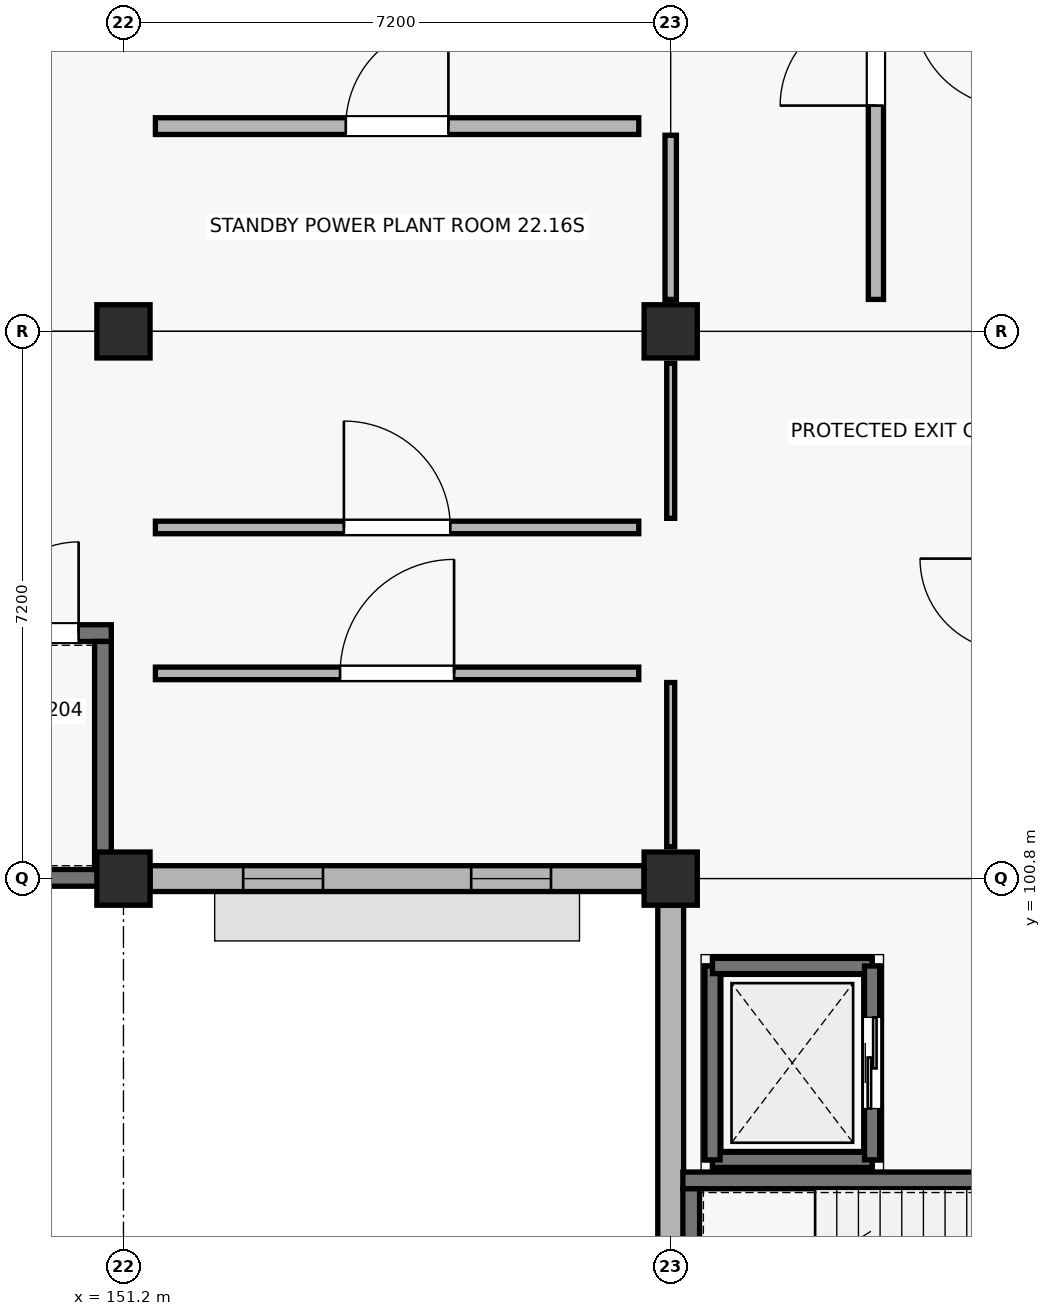
"""IFC4 building model, lengths in metres.
Left out: names, types, materials, properties, quantities, classifications, styles, units other than length and angle.
Written with IfcOpenShell. Run it as: python <this file> out.ifc"""

import sys

from ifc_helpers import new_model, si_unit, direction, frame, frame_2d, origin, origin_2d, place, context, subcontext, project, spatial, rectangle, extrude, element, fill, save


model = new_model("IFC4")
c1 = context("Model", 3, precision=1e-05, world=origin(), true_north=direction((0.0, 1.0)))
c2 = subcontext(c1, "Body", "Model", "MODEL_VIEW")
j1 = project(units=[si_unit("LENGTHUNIT", "METRE"), si_unit("PLANEANGLEUNIT", "RADIAN")], contexts=[c1])
p1 = place(None, origin())
s1 = spatial("IfcSite", under=j1, at=p1, CompositionType="ELEMENT")
p2 = place(p1, origin())
s2 = spatial("IfcBuilding", under=s1, at=p2, CompositionType="ELEMENT")
p3 = place(p2, origin())
s3 = spatial("IfcBuildingStorey", under=s2, at=p3, CompositionType="ELEMENT", Elevation=0.0)
for number, where, z_axis, x_axis in (
    (1, (151.2, 100.8, -0.25), (0.0, 0.0, 1.0), (1.0, 0.0, 0.0)),
    (2, (151.2, 108.0, -0.25), (0.0, 0.0, 1.0), (1.0, 0.0, 0.0)),
    (3, (158.4, 100.8, -0.25), (0.0, 0.0, 1.0), (1.0, 0.0, 0.0)),
    (4, (158.4, 108.0, -0.25), (0.0, 0.0, 1.0), (1.0, 0.0, 0.0)),
):
    element("IfcColumn", number, at=place(p3, frame(where, z_axis=z_axis, x_axis=x_axis)), inside=s3, PredefinedType="COLUMN", context=c2, shape_type="SweptSolid", body=[
        extrude(rectangle(XDim=0.7, YDim=0.7, at=origin_2d()), origin(), (0.0, 0.0, 1.0), 4.75),
    ])
p4 = place(p3, frame((151.55, 100.8, 0.0), z_axis=(0.0, 0.0, 1.0), x_axis=(1.0, 0.0, 0.0)))
e5 = element("IfcWall", 5, at=p4, inside=s3, PredefinedType="SOLIDWALL", context=c2, shape_type="SweptSolid", body=[
    extrude(rectangle(XDim=6.5, YDim=0.34, at=frame_2d((3.25, 0.0))), origin(), (0.0, 0.0, 1.0), 3.47),
])
p5 = place(p4, frame((1.225, 0.0, 0.9)))
e6 = element("IfcOpeningElement", 6, at=p5, cuts=e5, PredefinedType="OPENING", context=c2, shape_type="SweptSolid", body=[
    extrude(rectangle(XDim=1.05, YDim=1.75, at=frame_2d((0.525, 0.875))), frame((0.0, 0.18, 0.0), z_axis=(0.0, -1.0, 0.0), x_axis=(1.0, 0.0, 0.0)), (0.0, 0.0, 1.0), 0.36),
])
p6 = place(p4, frame((4.225, 0.0, 0.9)))
e7 = element("IfcOpeningElement", 7, at=p6, cuts=e5, PredefinedType="OPENING", context=c2, shape_type="SweptSolid", body=[
    extrude(rectangle(XDim=1.05, YDim=1.75, at=frame_2d((0.525, 0.875))), frame((0.0, 0.18, 0.0), z_axis=(0.0, -1.0, 0.0), x_axis=(1.0, 0.0, 0.0)), (0.0, 0.0, 1.0), 0.36),
])
p7 = place(p3, frame((158.4, 100.45, 0.0), z_axis=(0.0, 0.0, 1.0), x_axis=(0.0, -1.0, 0.0)))
e8 = element("IfcWall", 8, at=p7, inside=s3, PredefinedType="SOLIDWALL", context=c2, shape_type="SweptSolid", body=[
    extrude(rectangle(XDim=6.5, YDim=0.34, at=frame_2d((3.25, 0.0))), origin(), (0.0, 0.0, 1.0), 3.52),
])
p8 = place(p3, frame((158.95, 97.1, -0.95), z_axis=(0.0, 0.0, 1.0), x_axis=(1.0, 0.0, 0.0)))
e9 = element("IfcWall", 9, at=p8, inside=s3, PredefinedType="SHEAR", context=c2, shape_type="SweptSolid", body=[
    extrude(rectangle(XDim=2.1, YDim=0.22, at=frame_2d((1.05, 0.0))), origin(), (0.0, 0.0, 1.0), 0.95),
])
p9 = place(p3, frame((161.05, 97.1, -0.95), z_axis=(0.0, 0.0, 1.0), x_axis=(0.0, 1.0, 0.0)))
e10 = element("IfcWall", 10, at=p9, inside=s3, PredefinedType="SHEAR", context=c2, shape_type="SweptSolid", body=[
    extrude(rectangle(XDim=2.55, YDim=0.22, at=frame_2d((1.275, 0.0))), origin(), (0.0, 0.0, 1.0), 0.95),
])
p10 = place(p3, frame((161.05, 99.65, -0.95), z_axis=(0.0, 0.0, 1.0), x_axis=(-1.0, 0.0, 0.0)))
e11 = element("IfcWall", 11, at=p10, inside=s3, PredefinedType="SHEAR", context=c2, shape_type="SweptSolid", body=[
    extrude(rectangle(XDim=2.1, YDim=0.22, at=frame_2d((1.05, 0.0))), origin(), (0.0, 0.0, 1.0), 0.95),
])
p11 = place(p3, frame((158.95, 99.65, -0.95), z_axis=(0.0, 0.0, 1.0), x_axis=(0.0, -1.0, 0.0)))
e12 = element("IfcWall", 12, at=p11, inside=s3, PredefinedType="SHEAR", context=c2, shape_type="SweptSolid", body=[
    extrude(rectangle(XDim=2.55, YDim=0.22, at=frame_2d((1.275, 0.0))), origin(), (0.0, 0.0, 1.0), 0.95),
])
p12 = place(p3, frame((158.56, 96.83, -0.25), z_axis=(0.0, 0.0, 1.0), x_axis=(1.0, 0.0, 0.0)))
e13 = element("IfcWall", 13, at=p12, inside=s3, PredefinedType="SHEAR", context=c2, shape_type="SweptSolid", body=[
    extrude(rectangle(XDim=6.88, YDim=0.22, at=frame_2d((3.44, 0.0))), origin(), (0.0, 0.0, 1.0), 4.47),
])
p13 = place(p12, frame((5.25, 0.0, 0.25)))
e14 = element("IfcOpeningElement", 14, at=p13, cuts=e13, PredefinedType="OPENING", context=c2, shape_type="SweptSolid", body=[
    extrude(rectangle(XDim=1.2, YDim=2.15, at=frame_2d((0.6, 1.075))), frame((0.0, 0.12, 0.0), z_axis=(0.0, -1.0, 0.0), x_axis=(1.0, 0.0, 0.0)), (0.0, 0.0, 1.0), 0.24),
])
p14 = place(p3, frame((158.67, 93.72, -0.25), z_axis=(0.0, 0.0, 1.0), x_axis=(0.0, 1.0, 0.0)))
e15 = element("IfcWall", 15, at=p14, inside=s3, PredefinedType="SHEAR", context=c2, shape_type="SweptSolid", body=[
    extrude(rectangle(XDim=3.0, YDim=0.22, at=frame_2d((1.5, 0.0))), origin(), (0.0, 0.0, 1.0), 4.47),
])
p15 = place(p3, frame((158.95, 97.1, 0.0), z_axis=(0.0, 0.0, 1.0), x_axis=(1.0, 0.0, 0.0)))
e16 = element("IfcWall", 16, at=p15, inside=s3, PredefinedType="SHEAR", context=c2, shape_type="SweptSolid", body=[
    extrude(rectangle(XDim=2.1, YDim=0.2, at=frame_2d((1.05, 0.0))), origin(), (0.0, 0.0, 1.0), 4.22),
])
p16 = place(p3, frame((158.95, 97.1, 0.0), z_axis=(0.0, 0.0, 1.0), x_axis=(0.0, 1.0, 0.0)))
e17 = element("IfcWall", 17, at=p16, inside=s3, PredefinedType="SHEAR", context=c2, shape_type="SweptSolid", body=[
    extrude(rectangle(XDim=2.55, YDim=0.2, at=frame_2d((1.275, 0.0))), origin(), (0.0, 0.0, 1.0), 4.22),
])
p17 = place(p3, frame((158.95, 99.65, 0.0), z_axis=(0.0, 0.0, 1.0), x_axis=(1.0, 0.0, 0.0)))
e18 = element("IfcWall", 18, at=p17, inside=s3, PredefinedType="SHEAR", context=c2, shape_type="SweptSolid", body=[
    extrude(rectangle(XDim=2.1, YDim=0.2, at=frame_2d((1.05, 0.0))), origin(), (0.0, 0.0, 1.0), 4.22),
])
p18 = place(p3, frame((161.05, 97.1, 0.0), z_axis=(0.0, 0.0, 1.0), x_axis=(0.0, 1.0, 0.0)))
e19 = element("IfcWall", 19, at=p18, inside=s3, PredefinedType="SHEAR", context=c2, shape_type="SweptSolid", body=[
    extrude(rectangle(XDim=2.55, YDim=0.2, at=frame_2d((1.275, 0.0))), origin(), (0.0, 0.0, 1.0), 4.22),
])
p19 = place(p18, frame((0.675, 0.0, 0.0)))
e20 = element("IfcOpeningElement", 20, at=p19, cuts=e19, PredefinedType="OPENING", context=c2, shape_type="SweptSolid", body=[
    extrude(rectangle(XDim=1.2, YDim=2.15, at=frame_2d((0.6, 1.075))), frame((0.0, 0.11, 0.0), z_axis=(0.0, -1.0, 0.0), x_axis=(1.0, 0.0, 0.0)), (0.0, 0.0, 1.0), 0.22),
])
p20 = place(p3, frame((144.16, 100.81, -0.25), z_axis=(0.0, 0.0, 1.0), x_axis=(1.0, 0.0, 0.0)))
e21 = element("IfcWall", 21, at=p20, inside=s3, PredefinedType="SHEAR", context=c2, shape_type="SweptSolid", body=[
    extrude(rectangle(XDim=6.88, YDim=0.22, at=frame_2d((3.44, 0.0))), origin(), (0.0, 0.0, 1.0), 4.47),
])
p21 = place(p3, frame((144.16, 104.03, -0.25), z_axis=(0.0, 0.0, 1.0), x_axis=(1.0, 0.0, 0.0)))
e22 = element("IfcWall", 22, at=p21, inside=s3, PredefinedType="SHEAR", context=c2, shape_type="SweptSolid", body=[
    extrude(rectangle(XDim=6.88, YDim=0.22, at=frame_2d((3.44, 0.0))), origin(), (0.0, 0.0, 1.0), 4.47),
])
p22 = place(p21, frame((5.25, 0.0, 0.25)))
e23 = element("IfcOpeningElement", 23, at=p22, cuts=e22, PredefinedType="OPENING", context=c2, shape_type="SweptSolid", body=[
    extrude(rectangle(XDim=1.2, YDim=2.15, at=frame_2d((0.6, 1.075))), frame((0.0, 0.12, 0.0), z_axis=(0.0, -1.0, 0.0), x_axis=(1.0, 0.0, 0.0)), (0.0, 0.0, 1.0), 0.24),
])
p23 = place(p3, frame((150.93, 100.92, -0.25), z_axis=(0.0, 0.0, 1.0), x_axis=(0.0, 1.0, 0.0)))
e24 = element("IfcWall", 24, at=p23, inside=s3, PredefinedType="SHEAR", context=c2, shape_type="SweptSolid", body=[
    extrude(rectangle(XDim=3.0, YDim=0.22, at=frame_2d((1.5, 0.0))), origin(), (0.0, 0.0, 1.0), 4.47),
])
p24 = place(p3, frame((151.62, 103.5, 0.0), z_axis=(0.0, 0.0, 1.0), x_axis=(1.0, 0.0, 0.0)))
e25 = element("IfcWall", 25, at=p24, inside=s3, PredefinedType="PARTITIONING", context=c2, shape_type="SweptSolid", body=[
    extrude(rectangle(XDim=6.36, YDim=0.165, at=frame_2d((3.18, 0.0))), origin(), (0.0, 0.0, 1.0), 3.36),
])
p25 = place(p24, frame((2.43, 0.0, 0.0)))
e26 = element("IfcOpeningElement", 26, at=p25, cuts=e25, PredefinedType="OPENING", context=c2, shape_type="SweptSolid", body=[
    extrude(rectangle(XDim=1.5, YDim=2.2, at=frame_2d((0.75, 1.1))), frame((0.0, 0.093, 0.0), z_axis=(0.0, -1.0, 0.0), x_axis=(1.0, 0.0, 0.0)), (0.0, 0.0, 1.0), 0.185),
])
p26 = place(p3, frame((158.4, 101.22, 0.0), z_axis=(0.0, 0.0, 1.0), x_axis=(0.0, 1.0, 0.0)))
e27 = element("IfcWall", 27, at=p26, inside=s3, PredefinedType="PARTITIONING", context=c2, shape_type="SweptSolid", body=[
    extrude(rectangle(XDim=2.16, YDim=0.105, at=frame_2d((1.08, 0.0))), origin(), (0.0, 0.0, 1.0), 3.36),
])
p27 = place(p3, frame((151.62, 105.42, 0.0), z_axis=(0.0, 0.0, 1.0), x_axis=(1.0, 0.0, 0.0)))
e28 = element("IfcWall", 28, at=p27, inside=s3, PredefinedType="PARTITIONING", context=c2, shape_type="SweptSolid", body=[
    extrude(rectangle(XDim=6.36, YDim=0.165, at=frame_2d((3.18, 0.0))), origin(), (0.0, 0.0, 1.0), 3.36),
])
p28 = place(p27, frame((2.48, 0.0, 0.0)))
e29 = element("IfcOpeningElement", 29, at=p28, cuts=e28, PredefinedType="OPENING", context=c2, shape_type="SweptSolid", body=[
    extrude(rectangle(XDim=1.4, YDim=2.2, at=frame_2d((0.7, 1.1))), frame((0.0, 0.093, 0.0), z_axis=(0.0, -1.0, 0.0), x_axis=(1.0, 0.0, 0.0)), (0.0, 0.0, 1.0), 0.185),
])
p29 = place(p3, frame((158.4, 105.54, 0.0), z_axis=(0.0, 0.0, 1.0), x_axis=(0.0, 1.0, 0.0)))
e30 = element("IfcWall", 30, at=p29, inside=s3, PredefinedType="PARTITIONING", context=c2, shape_type="SweptSolid", body=[
    extrude(rectangle(XDim=2.04, YDim=0.105, at=frame_2d((1.02, 0.0))), origin(), (0.0, 0.0, 1.0), 3.36),
])
p30 = place(p3, frame((151.62, 110.7, 0.0), z_axis=(0.0, 0.0, 1.0), x_axis=(1.0, 0.0, 0.0)))
e31 = element("IfcWall", 31, at=p30, inside=s3, PredefinedType="SOLIDWALL", context=c2, shape_type="SweptSolid", body=[
    extrude(rectangle(XDim=6.36, YDim=0.22, at=frame_2d((3.18, 0.0))), origin(), (0.0, 0.0, 1.0), 3.36),
])
p31 = place(p30, frame((2.505, 0.0, 0.0)))
e32 = element("IfcOpeningElement", 32, at=p31, cuts=e31, PredefinedType="OPENING", context=c2, shape_type="SweptSolid", body=[
    extrude(rectangle(XDim=1.35, YDim=2.2, at=frame_2d((0.675, 1.1))), frame((0.0, 0.12, 0.0), z_axis=(0.0, -1.0, 0.0), x_axis=(1.0, 0.0, 0.0)), (0.0, 0.0, 1.0), 0.24),
])
p32 = place(p3, frame((158.4, 108.42, 0.0), z_axis=(0.0, 0.0, 1.0), x_axis=(0.0, 1.0, 0.0)))
e33 = element("IfcWall", 33, at=p32, inside=s3, PredefinedType="PARTITIONING", context=c2, shape_type="SweptSolid", body=[
    extrude(rectangle(XDim=2.16, YDim=0.15, at=frame_2d((1.08, 0.0))), origin(), (0.0, 0.0, 1.0), 3.36),
])
p33 = place(p3, frame((161.1, 108.42, 0.0), z_axis=(0.0, 0.0, 1.0), x_axis=(0.0, 1.0, 0.0)))
e34 = element("IfcWall", 34, at=p33, inside=s3, PredefinedType="SOLIDWALL", context=c2, shape_type="SweptSolid", body=[
    extrude(rectangle(XDim=6.36, YDim=0.2, at=frame_2d((3.18, 0.0))), origin(), (0.0, 0.0, 1.0), 3.36),
])
p34 = place(p33, frame((2.55, 0.0, 0.0)))
e35 = element("IfcOpeningElement", 35, at=p34, cuts=e34, PredefinedType="OPENING", context=c2, shape_type="SweptSolid", body=[
    extrude(rectangle(XDim=1.26, YDim=2.04, at=frame_2d((0.63, 1.02))), frame((0.0, 0.11, 0.0), z_axis=(0.0, -1.0, 0.0), x_axis=(1.0, 0.0, 0.0)), (0.0, 0.0, 1.0), 0.22),
])
p35 = place(p5, origin())
e36 = element("IfcWindow", 36, at=p35, inside=s3, PartitioningType="SINGLE_PANEL", PredefinedType="WINDOW", context=c2, shape_type="SweptSolid", body=[
    extrude(rectangle(XDim=1.05, YDim=1.75, at=frame_2d((0.525, 0.875))), frame((0.0, 0.03, 0.0), z_axis=(0.0, -1.0, 0.0), x_axis=(1.0, 0.0, 0.0)), (0.0, 0.0, 1.0), 0.06),
])
fill(e6, e36)
p36 = place(p6, origin())
e37 = element("IfcWindow", 37, at=p36, inside=s3, PartitioningType="SINGLE_PANEL", PredefinedType="WINDOW", context=c2, shape_type="SweptSolid", body=[
    extrude(rectangle(XDim=1.05, YDim=1.75, at=frame_2d((0.525, 0.875))), frame((0.0, 0.03, 0.0), z_axis=(0.0, -1.0, 0.0), x_axis=(1.0, 0.0, 0.0)), (0.0, 0.0, 1.0), 0.06),
])
fill(e7, e37)
p37 = place(p19, origin())
e38 = element("IfcDoor", 38, at=p37, inside=s3, OperationType="SLIDING_TO_LEFT", PredefinedType="DOOR", context=c2, shape_type="SweptSolid", body=[
    extrude(rectangle(XDim=1.2, YDim=2.15, at=frame_2d((0.6, 1.075))), frame((0.0, 0.025, 0.0), z_axis=(0.0, -1.0, 0.0), x_axis=(1.0, 0.0, 0.0)), (0.0, 0.0, 1.0), 0.05),
])
fill(e20, e38)
p38 = place(p22, origin())
e39 = element("IfcDoor", 39, at=p38, inside=s3, OperationType="SINGLE_SWING_RIGHT", PredefinedType="DOOR", context=c2, shape_type="SweptSolid", body=[
    extrude(rectangle(XDim=1.2, YDim=2.15, at=frame_2d((0.6, 1.075))), frame((0.0, 0.025, 0.0), z_axis=(0.0, -1.0, 0.0), x_axis=(1.0, 0.0, 0.0)), (0.0, 0.0, 1.0), 0.05),
])
fill(e23, e39)
p39 = place(p25, origin())
e40 = element("IfcDoor", 40, at=p39, inside=s3, OperationType="SINGLE_SWING_RIGHT", PredefinedType="DOOR", context=c2, shape_type="SweptSolid", body=[
    extrude(rectangle(XDim=1.5, YDim=2.2, at=frame_2d((0.75, 1.1))), frame((0.0, 0.025, 0.0), z_axis=(0.0, -1.0, 0.0), x_axis=(1.0, 0.0, 0.0)), (0.0, 0.0, 1.0), 0.05),
])
fill(e26, e40)
p40 = place(p28, origin())
e41 = element("IfcDoor", 41, at=p40, inside=s3, OperationType="SINGLE_SWING_LEFT", PredefinedType="DOOR", context=c2, shape_type="SweptSolid", body=[
    extrude(rectangle(XDim=1.4, YDim=2.2, at=frame_2d((0.7, 1.1))), frame((0.0, 0.025, 0.0), z_axis=(0.0, -1.0, 0.0), x_axis=(1.0, 0.0, 0.0)), (0.0, 0.0, 1.0), 0.05),
])
fill(e29, e41)
p41 = place(p31, origin())
e42 = element("IfcDoor", 42, at=p41, inside=s3, OperationType="SINGLE_SWING_RIGHT", PredefinedType="DOOR", context=c2, shape_type="SweptSolid", body=[
    extrude(rectangle(XDim=1.35, YDim=2.2, at=frame_2d((0.675, 1.1))), frame((0.0, 0.025, 0.0), z_axis=(0.0, -1.0, 0.0), x_axis=(1.0, 0.0, 0.0)), (0.0, 0.0, 1.0), 0.05),
])
fill(e32, e42)
p42 = place(p34, origin())
e43 = element("IfcDoor", 43, at=p42, inside=s3, OperationType="SINGLE_SWING_LEFT", PredefinedType="DOOR", context=c2, shape_type="SweptSolid", body=[
    extrude(rectangle(XDim=1.26, YDim=2.04, at=frame_2d((0.63, 1.02))), frame((0.0, 0.025, 0.0), z_axis=(0.0, -1.0, 0.0), x_axis=(1.0, 0.0, 0.0)), (0.0, 0.0, 1.0), 0.05),
])
fill(e35, e43)
save(model, sys.argv[1])
